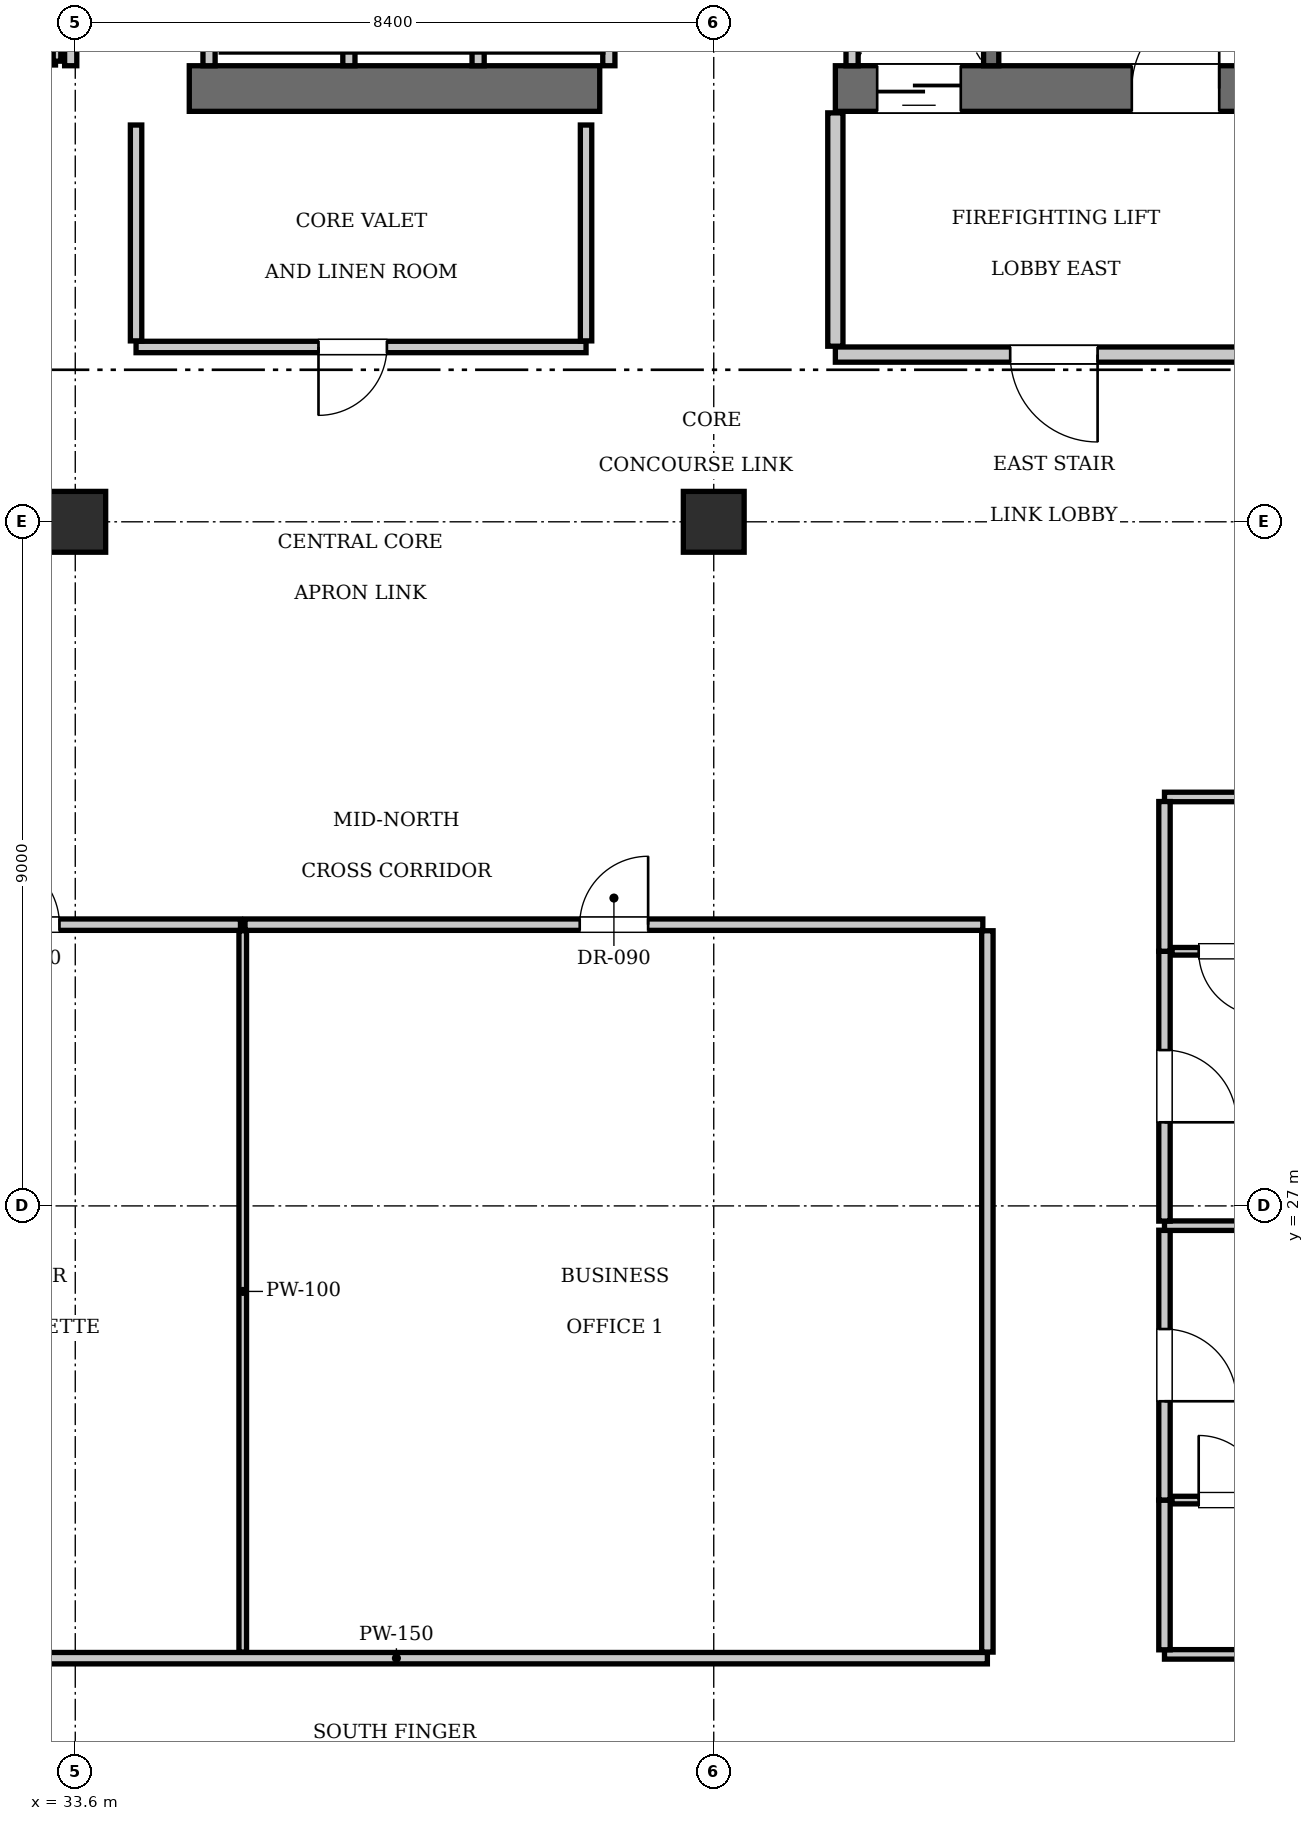
"""IFC4 building model, lengths in metres.
Left out: names, types, materials, properties, quantities, classifications, styles, units other than length and angle.
Written with IfcOpenShell. Run it as: python <this file> out.ifc"""

import sys

from ifc_helpers import new_model, si_unit, direction, frame, frame_2d, origin, origin_2d, place, context, subcontext, project, spatial, rectangle, extrude, element, fill, save


model = new_model("IFC4")
c1 = context("Model", 3, precision=1e-05, world=origin(), true_north=direction((0.0, 1.0)))
c2 = subcontext(c1, "Body", "Model", "MODEL_VIEW")
j1 = project(units=[si_unit("LENGTHUNIT", "METRE"), si_unit("PLANEANGLEUNIT", "RADIAN")], contexts=[c1])
p1 = place(None, origin())
s1 = spatial("IfcSite", under=j1, at=p1, CompositionType="ELEMENT")
p2 = place(p1, origin())
s2 = spatial("IfcBuilding", under=s1, at=p2, CompositionType="ELEMENT")
p3 = place(p2, frame((0.0, 0.0, 247.1)))
s3 = spatial("IfcBuildingStorey", under=s2, at=p3, CompositionType="ELEMENT", Elevation=247.1)
p4 = place(p3, frame((35.1, 41.7, 0.0), z_axis=(0.0, 0.0, 1.0), x_axis=(1.0, 0.0, 0.0)))
e1 = element("IfcWall", 1, at=p4, inside=s3, PredefinedType="SHEAR", context=c2, shape_type="SweptSolid", body=[
    extrude(rectangle(XDim=5.4, YDim=0.6, at=frame_2d((2.7, 0.0))), origin(), (0.0, 0.0, 1.0), 3.85),
])
p5 = place(p3, frame((43.6, 41.7, 0.0), z_axis=(0.0, 0.0, 1.0), x_axis=(1.0, 0.0, 0.0)))
e2 = element("IfcWall", 2, at=p5, inside=s3, PredefinedType="SHEAR", context=c2, shape_type="SweptSolid", body=[
    extrude(rectangle(XDim=6.8, YDim=0.6, at=frame_2d((3.4, 0.0))), origin(), (0.0, 0.0, 1.0), 3.85),
])
p6 = place(p5, frame((3.9, 0.0, 0.0)))
e3 = element("IfcOpeningElement", 3, at=p6, cuts=e2, PredefinedType="OPENING", context=c2, shape_type="SweptSolid", body=[
    extrude(rectangle(XDim=1.15, YDim=2.15, at=frame_2d((0.575, 1.075))), frame((0.0, 0.31, 0.0), z_axis=(0.0, -1.0, 0.0), x_axis=(1.0, 0.0, 0.0)), (0.0, 0.0, 1.0), 0.62),
])
p7 = place(p5, frame((0.55, 0.0, 0.0)))
e4 = element("IfcOpeningElement", 4, at=p7, cuts=e2, PredefinedType="OPENING", context=c2, shape_type="SweptSolid", body=[
    extrude(rectangle(XDim=1.1, YDim=2.2, at=frame_2d((0.55, 1.1))), frame((0.0, 0.31, 0.0), z_axis=(0.0, -1.0, 0.0), x_axis=(1.0, 0.0, 0.0)), (0.0, 0.0, 1.0), 0.62),
])
for number, where, z_axis, x_axis in (
    (5, (33.6, 36.0, 0.0), (0.0, 0.0, 1.0), (1.0, 0.0, 0.0)),
    (6, (42.0, 36.0, 0.0), (0.0, 0.0, 1.0), (1.0, 0.0, 0.0)),
):
    element("IfcColumn", number, at=place(p3, frame(where, z_axis=z_axis, x_axis=x_axis)), inside=s3, PredefinedType="COLUMN", context=c2, shape_type="SweptSolid", body=[
        extrude(rectangle(XDim=0.8, YDim=0.8, at=origin_2d()), origin(), (0.0, 0.0, 1.0), 3.85),
    ])
p8 = place(p3, frame((45.65, 42.0, 0.0), z_axis=(0.0, 0.0, 1.0), x_axis=(0.0, 1.0, 0.0)))
e7 = element("IfcWall", 7, at=p8, inside=s3, PredefinedType="SOLIDWALL", context=c2, shape_type="SweptSolid", body=[
    extrude(rectangle(XDim=9.15, YDim=0.2, at=frame_2d((4.575, 0.0))), origin(), (0.0, 0.0, 1.0), 3.61),
])
p9 = place(p3, frame((43.82, 42.0, 0.0), z_axis=(0.0, 0.0, 1.0), x_axis=(0.0, 1.0, 0.0)))
e8 = element("IfcWall", 8, at=p9, inside=s3, PredefinedType="SOLIDWALL", context=c2, shape_type="SweptSolid", body=[
    extrude(rectangle(XDim=2.74, YDim=0.16, at=frame_2d((1.37, 0.0))), origin(), (0.0, 0.0, 1.0), 3.61),
])
for number, where, z_axis, x_axis in (
    (9, (37.2, 42.0, 0.0), (0.0, 0.0, 1.0), (0.0, 1.0, 0.0)),
    (10, (38.9, 42.0, 0.0), (0.0, 0.0, 1.0), (0.0, 1.0, 0.0)),
    (11, (40.62, 42.0, 0.0), (0.0, 0.0, 1.0), (0.0, 1.0, 0.0)),
):
    element("IfcWall", number, at=place(p3, frame(where, z_axis=z_axis, x_axis=x_axis)), inside=s3, PredefinedType="SOLIDWALL", context=c2, shape_type="SweptSolid", body=[
        extrude(rectangle(XDim=2.35, YDim=0.16, at=frame_2d((1.175, 0.0))), origin(), (0.0, 0.0, 1.0), 3.61),
    ])
for number, where, z_axis, x_axis in (
    (12, (33.54, 42.0, 0.0), (0.0, 0.0, 1.0), (0.0, 1.0, 0.0)),
    (13, (35.36, 42.0, 0.0), (0.0, 0.0, 1.0), (0.0, 1.0, 0.0)),
):
    element("IfcWall", number, at=place(p3, frame(where, z_axis=z_axis, x_axis=x_axis)), inside=s3, PredefinedType="SOLIDWALL", context=c2, shape_type="SweptSolid", body=[
        extrude(rectangle(XDim=2.4, YDim=0.16, at=frame_2d((1.2, 0.0))), origin(), (0.0, 0.0, 1.0), 3.61),
    ])
p10 = place(p3, frame((43.6, 38.2, 0.0), z_axis=(0.0, 0.0, 1.0), x_axis=(1.0, 0.0, 0.0)))
e14 = element("IfcWall", 14, at=p10, inside=s3, PredefinedType="PARTITIONING", context=c2, shape_type="SweptSolid", body=[
    extrude(rectangle(XDim=5.8, YDim=0.2, at=frame_2d((2.9, 0.0))), origin(), (0.0, 0.0, 1.0), 3.61),
])
p11 = place(p10, frame((2.3, 0.0, 0.0)))
e15 = element("IfcOpeningElement", 15, at=p11, cuts=e14, PredefinedType="OPENING", context=c2, shape_type="SweptSolid", body=[
    extrude(rectangle(XDim=1.15, YDim=2.15, at=frame_2d((0.575, 1.075))), frame((0.0, 0.11, 0.0), z_axis=(0.0, -1.0, 0.0), x_axis=(1.0, 0.0, 0.0)), (0.0, 0.0, 1.0), 0.22),
])
p12 = place(p3, frame((43.6, 38.31, 0.0), z_axis=(0.0, 0.0, 1.0), x_axis=(0.0, 1.0, 0.0)))
e16 = element("IfcWall", 16, at=p12, inside=s3, PredefinedType="PARTITIONING", context=c2, shape_type="SweptSolid", body=[
    extrude(rectangle(XDim=3.07, YDim=0.2, at=frame_2d((1.535, 0.0))), origin(), (0.0, 0.0, 1.0), 3.61),
])
p13 = place(p3, frame((32.02, 42.06, 0.0), z_axis=(0.0, 0.0, 1.0), x_axis=(1.0, 0.0, 0.0)))
e17 = element("IfcWall", 17, at=p13, inside=s3, PredefinedType="PARTITIONING", context=c2, shape_type="SweptSolid", body=[
    extrude(rectangle(XDim=1.32, YDim=0.1, at=frame_2d((0.66, 0.0))), origin(), (0.0, 0.0, 1.0), 3.61),
])
p14 = place(p13, frame((0.24, 0.0, 0.0)))
e18 = element("IfcOpeningElement", 18, at=p14, cuts=e17, PredefinedType="OPENING", context=c2, shape_type="SweptSolid", body=[
    extrude(rectangle(XDim=0.8, YDim=2.05, at=frame_2d((0.4, 1.025))), frame((0.0, 0.06, 0.0), z_axis=(0.0, -1.0, 0.0), x_axis=(1.0, 0.0, 0.0)), (0.0, 0.0, 1.0), 0.12),
])
p15 = place(p3, frame((33.36, 42.06, 0.0), z_axis=(0.0, 0.0, 1.0), x_axis=(0.0, 1.0, 0.0)))
e19 = element("IfcWall", 19, at=p15, inside=s3, PredefinedType="PARTITIONING", context=c2, shape_type="SweptSolid", body=[
    extrude(rectangle(XDim=2.88, YDim=0.1, at=frame_2d((1.44, 0.0))), origin(), (0.0, 0.0, 1.0), 3.61),
])
p16 = place(p3, frame((34.4, 38.3, 0.0), z_axis=(0.0, 0.0, 1.0), x_axis=(1.0, 0.0, 0.0)))
e20 = element("IfcWall", 20, at=p16, inside=s3, PredefinedType="PARTITIONING", context=c2, shape_type="SweptSolid", body=[
    extrude(rectangle(XDim=5.92, YDim=0.15, at=frame_2d((2.96, 0.0))), origin(), (0.0, 0.0, 1.0), 3.61),
])
p17 = place(p16, frame((2.4, 0.0, 0.0)))
e21 = element("IfcOpeningElement", 21, at=p17, cuts=e20, PredefinedType="OPENING", context=c2, shape_type="SweptSolid", body=[
    extrude(rectangle(XDim=0.9, YDim=2.1, at=frame_2d((0.45, 1.05))), frame((0.0, 0.085, 0.0), z_axis=(0.0, -1.0, 0.0), x_axis=(1.0, 0.0, 0.0)), (0.0, 0.0, 1.0), 0.17),
])
for number, where, z_axis, x_axis in (
    (22, (34.4, 38.38, 0.0), (0.0, 0.0, 1.0), (0.0, 1.0, 0.0)),
    (23, (40.32, 38.38, 0.0), (0.0, 0.0, 1.0), (0.0, 1.0, 0.0)),
):
    element("IfcWall", number, at=place(p3, frame(where, z_axis=z_axis, x_axis=x_axis)), inside=s3, PredefinedType="PARTITIONING", context=c2, shape_type="SweptSolid", body=[
        extrude(rectangle(XDim=2.84, YDim=0.15, at=frame_2d((1.42, 0.0))), origin(), (0.0, 0.0, 1.0), 3.61),
    ])
p18 = place(p3, frame((30.05, 21.05, 0.0), z_axis=(0.0, 0.0, 1.0), x_axis=(1.0, 0.0, 0.0)))
e24 = element("IfcWall", 24, at=p18, inside=s3, PredefinedType="PARTITIONING", context=c2, shape_type="SweptSolid", body=[
    extrude(rectangle(XDim=15.55, YDim=0.15, at=frame_2d((7.775, 0.0))), origin(), (0.0, 0.0, 1.0), 3.61),
])
p19 = place(p3, frame((45.6, 21.13, 0.0), z_axis=(0.0, 0.0, 1.0), x_axis=(0.0, 1.0, 0.0)))
e25 = element("IfcWall", 25, at=p19, inside=s3, PredefinedType="PARTITIONING", context=c2, shape_type="SweptSolid", body=[
    extrude(rectangle(XDim=9.49, YDim=0.15, at=frame_2d((4.745, 0.0))), origin(), (0.0, 0.0, 1.0), 3.61),
])
p20 = place(p3, frame((30.11, 30.7, 0.0), z_axis=(0.0, 0.0, 1.0), x_axis=(1.0, 0.0, 0.0)))
e26 = element("IfcWall", 26, at=p20, inside=s3, PredefinedType="PARTITIONING", context=c2, shape_type="SweptSolid", body=[
    extrude(rectangle(XDim=5.663, YDim=0.15, at=frame_2d((2.832, 0.0))), origin(), (0.0, 0.0, 1.0), 3.61),
])
p21 = place(p20, frame((2.382, 0.0, 0.0)))
e27 = element("IfcOpeningElement", 27, at=p21, cuts=e26, PredefinedType="OPENING", context=c2, shape_type="SweptSolid", body=[
    extrude(rectangle(XDim=0.9, YDim=2.1, at=frame_2d((0.45, 1.05))), frame((0.0, 0.085, 0.0), z_axis=(0.0, -1.0, 0.0), x_axis=(1.0, 0.0, 0.0)), (0.0, 0.0, 1.0), 0.17),
])
p22 = place(p3, frame((35.803, 21.13, 0.0), z_axis=(0.0, 0.0, 1.0), x_axis=(0.0, 1.0, 0.0)))
e28 = element("IfcWall", 28, at=p22, inside=s3, PredefinedType="PARTITIONING", context=c2, shape_type="SweptSolid", body=[
    extrude(rectangle(XDim=9.49, YDim=0.1, at=frame_2d((4.745, 0.0))), origin(), (0.0, 0.0, 1.0), 3.61),
])
p23 = place(p3, frame((35.833, 30.7, 0.0), z_axis=(0.0, 0.0, 1.0), x_axis=(1.0, 0.0, 0.0)))
e29 = element("IfcWall", 29, at=p23, inside=s3, PredefinedType="PARTITIONING", context=c2, shape_type="SweptSolid", body=[
    extrude(rectangle(XDim=9.707, YDim=0.15, at=frame_2d((4.853, 0.0))), origin(), (0.0, 0.0, 1.0), 3.61),
])
p24 = place(p23, frame((4.403, 0.0, 0.0)))
e30 = element("IfcOpeningElement", 30, at=p24, cuts=e29, PredefinedType="OPENING", context=c2, shape_type="SweptSolid", body=[
    extrude(rectangle(XDim=0.9, YDim=2.1, at=frame_2d((0.45, 1.05))), frame((0.0, 0.085, 0.0), z_axis=(0.0, -1.0, 0.0), x_axis=(1.0, 0.0, 0.0)), (0.0, 0.0, 1.0), 0.17),
])
for number, where, z_axis, x_axis in (
    (31, (47.93, 21.1, 0.0), (0.0, 0.0, 1.0), (1.0, 0.0, 0.0)),
    (32, (47.93, 32.38, 0.0), (0.0, 0.0, 1.0), (1.0, 0.0, 0.0)),
):
    element("IfcWall", number, at=place(p3, frame(where, z_axis=z_axis, x_axis=x_axis)), inside=s3, PredefinedType="PARTITIONING", context=c2, shape_type="SweptSolid", body=[
        extrude(rectangle(XDim=12.17, YDim=0.125, at=frame_2d((6.085, 0.0))), origin(), (0.0, 0.0, 1.0), 3.61),
    ])
p25 = place(p3, frame((47.93, 21.16, 0.0), z_axis=(0.0, 0.0, 1.0), x_axis=(0.0, 1.0, 0.0)))
e33 = element("IfcWall", 33, at=p25, inside=s3, PredefinedType="PARTITIONING", context=c2, shape_type="SweptSolid", body=[
    extrude(rectangle(XDim=1.97, YDim=0.15, at=frame_2d((0.985, 0.0))), origin(), (0.0, 0.0, 1.0), 3.61),
])
p26 = place(p3, frame((47.93, 23.13, 0.0), z_axis=(0.0, 0.0, 1.0), x_axis=(0.0, 1.0, 0.0)))
e34 = element("IfcWall", 34, at=p26, inside=s3, PredefinedType="PARTITIONING", context=c2, shape_type="SweptSolid", body=[
    extrude(rectangle(XDim=3.55, YDim=0.15, at=frame_2d((1.775, 0.0))), origin(), (0.0, 0.0, 1.0), 3.61),
])
p27 = place(p26, frame((1.3, 0.0, 0.0)))
e35 = element("IfcOpeningElement", 35, at=p27, cuts=e34, PredefinedType="OPENING", context=c2, shape_type="SweptSolid", body=[
    extrude(rectangle(XDim=0.95, YDim=2.15, at=frame_2d((0.475, 1.075))), frame((0.0, 0.085, 0.0), z_axis=(0.0, -1.0, 0.0), x_axis=(1.0, 0.0, 0.0)), (0.0, 0.0, 1.0), 0.17),
])
p28 = place(p3, frame((48.03, 23.13, 0.0), z_axis=(0.0, 0.0, 1.0), x_axis=(1.0, 0.0, 0.0)))
e36 = element("IfcWall", 36, at=p28, inside=s3, PredefinedType="PARTITIONING", context=c2, shape_type="SweptSolid", body=[
    extrude(rectangle(XDim=2.3, YDim=0.1, at=frame_2d((1.15, 0.0))), origin(), (0.0, 0.0, 1.0), 3.61),
])
p29 = place(p28, frame((0.35, 0.0, 0.0)))
e37 = element("IfcOpeningElement", 37, at=p29, cuts=e36, PredefinedType="OPENING", context=c2, shape_type="SweptSolid", body=[
    extrude(rectangle(XDim=0.85, YDim=2.1, at=frame_2d((0.425, 1.05))), frame((0.0, 0.06, 0.0), z_axis=(0.0, -1.0, 0.0), x_axis=(1.0, 0.0, 0.0)), (0.0, 0.0, 1.0), 0.12),
])
p30 = place(p3, frame((47.93, 26.74, 0.0), z_axis=(0.0, 0.0, 1.0), x_axis=(1.0, 0.0, 0.0)))
e38 = element("IfcWall", 38, at=p30, inside=s3, PredefinedType="PARTITIONING", context=c2, shape_type="SweptSolid", body=[
    extrude(rectangle(XDim=12.17, YDim=0.125, at=frame_2d((6.085, 0.0))), origin(), (0.0, 0.0, 1.0), 2.41),
])
p31 = place(p3, frame((47.93, 26.8, 0.0), z_axis=(0.0, 0.0, 1.0), x_axis=(0.0, 1.0, 0.0)))
e39 = element("IfcWall", 39, at=p31, inside=s3, PredefinedType="PARTITIONING", context=c2, shape_type="SweptSolid", body=[
    extrude(rectangle(XDim=3.55, YDim=0.15, at=frame_2d((1.775, 0.0))), origin(), (0.0, 0.0, 1.0), 3.61),
])
p32 = place(p31, frame((1.3, 0.0, 0.0)))
e40 = element("IfcOpeningElement", 40, at=p32, cuts=e39, PredefinedType="OPENING", context=c2, shape_type="SweptSolid", body=[
    extrude(rectangle(XDim=0.95, YDim=2.15, at=frame_2d((0.475, 1.075))), frame((0.0, 0.085, 0.0), z_axis=(0.0, -1.0, 0.0), x_axis=(1.0, 0.0, 0.0)), (0.0, 0.0, 1.0), 0.17),
])
p33 = place(p3, frame((47.93, 30.35, 0.0), z_axis=(0.0, 0.0, 1.0), x_axis=(0.0, 1.0, 0.0)))
e41 = element("IfcWall", 41, at=p33, inside=s3, PredefinedType="PARTITIONING", context=c2, shape_type="SweptSolid", body=[
    extrude(rectangle(XDim=1.97, YDim=0.15, at=frame_2d((0.985, 0.0))), origin(), (0.0, 0.0, 1.0), 3.61),
])
p34 = place(p3, frame((48.03, 30.35, 0.0), z_axis=(0.0, 0.0, 1.0), x_axis=(1.0, 0.0, 0.0)))
e42 = element("IfcWall", 42, at=p34, inside=s3, PredefinedType="PARTITIONING", context=c2, shape_type="SweptSolid", body=[
    extrude(rectangle(XDim=2.3, YDim=0.1, at=frame_2d((1.15, 0.0))), origin(), (0.0, 0.0, 1.0), 3.61),
])
p35 = place(p34, frame((0.35, 0.0, 0.0)))
e43 = element("IfcOpeningElement", 43, at=p35, cuts=e42, PredefinedType="OPENING", context=c2, shape_type="SweptSolid", body=[
    extrude(rectangle(XDim=0.85, YDim=2.1, at=frame_2d((0.425, 1.05))), frame((0.0, 0.06, 0.0), z_axis=(0.0, -1.0, 0.0), x_axis=(1.0, 0.0, 0.0)), (0.0, 0.0, 1.0), 0.12),
])
p36 = place(p6, origin())
e44 = element("IfcDoor", 44, at=p36, inside=s3, OperationType="SINGLE_SWING_RIGHT", PredefinedType="DOOR", context=c2, shape_type="SweptSolid", body=[
    extrude(rectangle(XDim=1.15, YDim=2.15, at=frame_2d((0.575, 1.075))), frame((0.0, 0.025, 0.0), z_axis=(0.0, -1.0, 0.0), x_axis=(1.0, 0.0, 0.0)), (0.0, 0.0, 1.0), 0.05),
])
fill(e3, e44)
p37 = place(p7, frame((1.1, 0.0, 0.0), z_axis=(0.0, 0.0, 1.0), x_axis=(-1.0, 0.0, 0.0)))
e45 = element("IfcDoor", 45, at=p37, inside=s3, OperationType="SLIDING_TO_LEFT", PredefinedType="DOOR", context=c2, shape_type="SweptSolid", body=[
    extrude(rectangle(XDim=1.1, YDim=2.2, at=frame_2d((0.55, 1.1))), frame((0.0, 0.025, 0.0), z_axis=(0.0, -1.0, 0.0), x_axis=(1.0, 0.0, 0.0)), (0.0, 0.0, 1.0), 0.05),
])
fill(e4, e45)
p38 = place(p11, frame((1.15, 0.0, 0.0), z_axis=(0.0, 0.0, 1.0), x_axis=(-1.0, 0.0, 0.0)))
e46 = element("IfcDoor", 46, at=p38, inside=s3, OperationType="SINGLE_SWING_LEFT", PredefinedType="DOOR", context=c2, shape_type="SweptSolid", body=[
    extrude(rectangle(XDim=1.15, YDim=2.15, at=frame_2d((0.575, 1.075))), frame((0.0, 0.025, 0.0), z_axis=(0.0, -1.0, 0.0), x_axis=(1.0, 0.0, 0.0)), (0.0, 0.0, 1.0), 0.05),
])
fill(e15, e46)
p39 = place(p17, frame((0.9, 0.0, 0.0), z_axis=(0.0, 0.0, 1.0), x_axis=(-1.0, 0.0, 0.0)))
e47 = element("IfcDoor", 47, at=p39, inside=s3, OperationType="SINGLE_SWING_RIGHT", PredefinedType="DOOR", context=c2, shape_type="SweptSolid", body=[
    extrude(rectangle(XDim=0.9, YDim=2.1, at=frame_2d((0.45, 1.05))), frame((0.0, 0.025, 0.0), z_axis=(0.0, -1.0, 0.0), x_axis=(1.0, 0.0, 0.0)), (0.0, 0.0, 1.0), 0.05),
])
fill(e21, e47)
p40 = place(p21, origin())
e48 = element("IfcDoor", 48, at=p40, inside=s3, OperationType="SINGLE_SWING_LEFT", PredefinedType="DOOR", context=c2, shape_type="SweptSolid", body=[
    extrude(rectangle(XDim=0.9, YDim=2.1, at=frame_2d((0.45, 1.05))), frame((0.0, 0.025, 0.0), z_axis=(0.0, -1.0, 0.0), x_axis=(1.0, 0.0, 0.0)), (0.0, 0.0, 1.0), 0.05),
])
fill(e27, e48)
p41 = place(p24, origin())
e49 = element("IfcDoor", 49, at=p41, inside=s3, OperationType="SINGLE_SWING_RIGHT", PredefinedType="DOOR", context=c2, shape_type="SweptSolid", body=[
    extrude(rectangle(XDim=0.9, YDim=2.1, at=frame_2d((0.45, 1.05))), frame((0.0, 0.025, 0.0), z_axis=(0.0, -1.0, 0.0), x_axis=(1.0, 0.0, 0.0)), (0.0, 0.0, 1.0), 0.05),
])
fill(e30, e49)
p42 = place(p29, origin())
e50 = element("IfcDoor", 50, at=p42, inside=s3, OperationType="SINGLE_SWING_LEFT", PredefinedType="DOOR", context=c2, shape_type="SweptSolid", body=[
    extrude(rectangle(XDim=0.85, YDim=2.1, at=frame_2d((0.425, 1.05))), frame((0.0, 0.025, 0.0), z_axis=(0.0, -1.0, 0.0), x_axis=(1.0, 0.0, 0.0)), (0.0, 0.0, 1.0), 0.05),
])
fill(e37, e50)
p43 = place(p27, frame((0.95, 0.0, 0.0), z_axis=(0.0, 0.0, 1.0), x_axis=(-1.0, 0.0, 0.0)))
e51 = element("IfcDoor", 51, at=p43, inside=s3, OperationType="SINGLE_SWING_RIGHT", PredefinedType="DOOR", context=c2, shape_type="SweptSolid", body=[
    extrude(rectangle(XDim=0.95, YDim=2.15, at=frame_2d((0.475, 1.075))), frame((0.0, 0.025, 0.0), z_axis=(0.0, -1.0, 0.0), x_axis=(1.0, 0.0, 0.0)), (0.0, 0.0, 1.0), 0.05),
])
fill(e35, e51)
p44 = place(p35, frame((0.85, 0.0, 0.0), z_axis=(0.0, 0.0, 1.0), x_axis=(-1.0, 0.0, 0.0)))
e52 = element("IfcDoor", 52, at=p44, inside=s3, OperationType="SINGLE_SWING_LEFT", PredefinedType="DOOR", context=c2, shape_type="SweptSolid", body=[
    extrude(rectangle(XDim=0.85, YDim=2.1, at=frame_2d((0.425, 1.05))), frame((0.0, 0.025, 0.0), z_axis=(0.0, -1.0, 0.0), x_axis=(1.0, 0.0, 0.0)), (0.0, 0.0, 1.0), 0.05),
])
fill(e43, e52)
p45 = place(p32, frame((0.95, 0.0, 0.0), z_axis=(0.0, 0.0, 1.0), x_axis=(-1.0, 0.0, 0.0)))
e53 = element("IfcDoor", 53, at=p45, inside=s3, OperationType="SINGLE_SWING_RIGHT", PredefinedType="DOOR", context=c2, shape_type="SweptSolid", body=[
    extrude(rectangle(XDim=0.95, YDim=2.15, at=frame_2d((0.475, 1.075))), frame((0.0, 0.025, 0.0), z_axis=(0.0, -1.0, 0.0), x_axis=(1.0, 0.0, 0.0)), (0.0, 0.0, 1.0), 0.05),
])
fill(e40, e53)
save(model, sys.argv[1])
